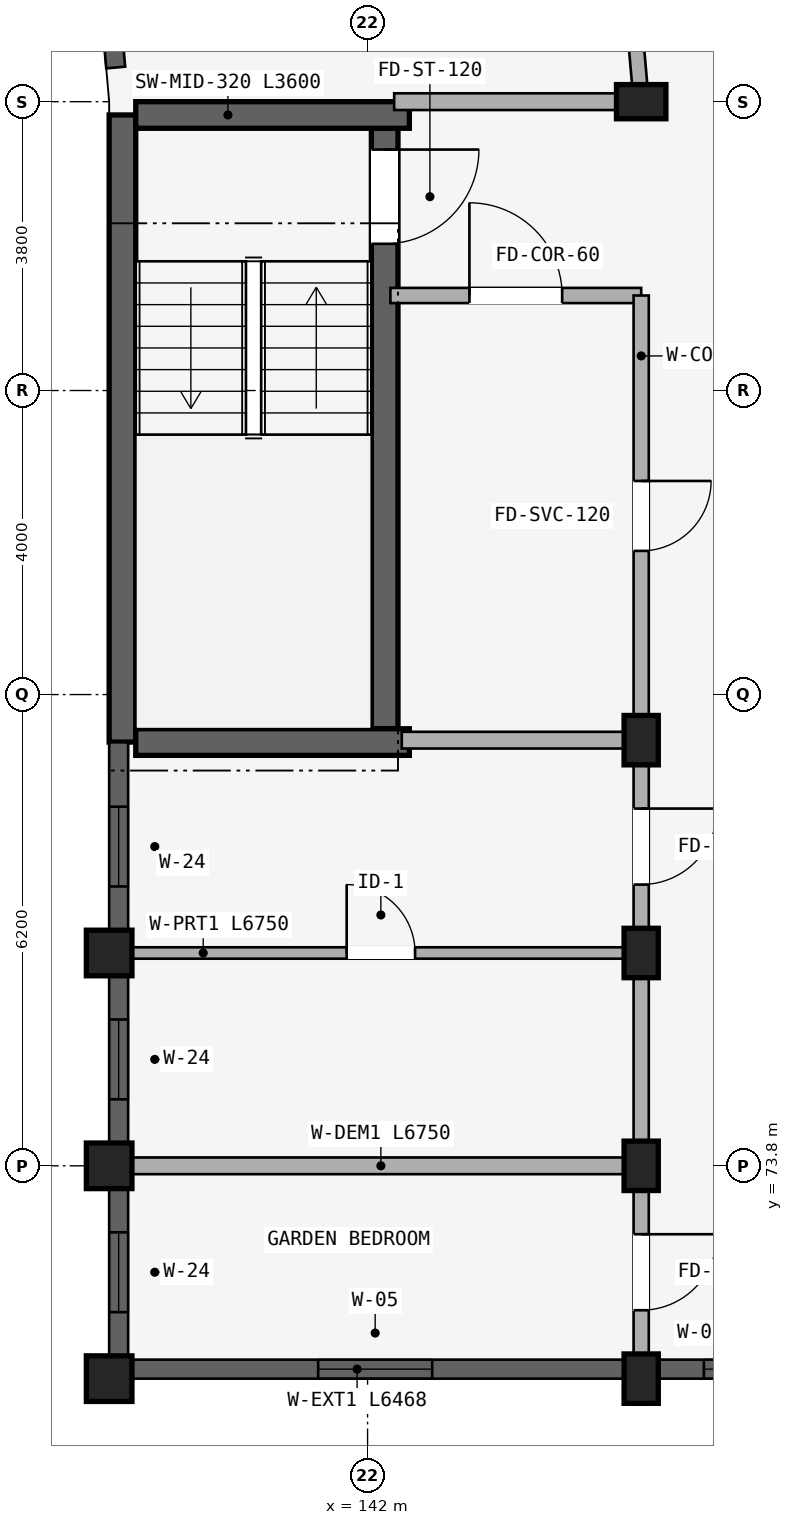
"""IFC4 building model, lengths in metres.
Left out: names, types, materials, properties, quantities, classifications, styles, units other than length and angle.
Written with IfcOpenShell. Run it as: python <this file> out.ifc"""

import sys

from ifc_helpers import new_model, si_unit, direction, frame, frame_2d, origin, origin_2d, place, context, subcontext, project, spatial, rectangle, extrude, element, fill, save


model = new_model("IFC4")
c1 = context("Model", 3, precision=1e-05, world=origin(), true_north=direction((0.0, 1.0)))
c2 = subcontext(c1, "Body", "Model", "MODEL_VIEW")
j1 = project(units=[si_unit("LENGTHUNIT", "METRE"), si_unit("PLANEANGLEUNIT", "RADIAN")], contexts=[c1])
p1 = place(None, origin())
s1 = spatial("IfcSite", under=j1, at=p1, CompositionType="ELEMENT")
p2 = place(p1, origin())
s2 = spatial("IfcBuilding", under=s1, at=p2, CompositionType="ELEMENT")
p3 = place(p2, frame((0.0, 0.0, 33.9)))
s3 = spatial("IfcBuildingStorey", under=s2, at=p3, CompositionType="ELEMENT", Elevation=33.9)
p4 = place(p3, frame((138.775, 87.625, 0.0), z_axis=(0.0, 0.0, 1.0), x_axis=(0.0, -1.0, 0.0)))
e1 = element("IfcWall", 1, at=p4, inside=s3, PredefinedType="SHEAR", context=c2, shape_type="SweptSolid", body=[
    extrude(rectangle(XDim=8.25, YDim=0.35, at=frame_2d((4.125, 0.0))), origin(), (0.0, 0.0, 1.0), 2.93),
])
p5 = place(p3, frame((142.225, 87.45, 0.0), z_axis=(0.0, 0.0, 1.0), x_axis=(0.0, -1.0, 0.0)))
e2 = element("IfcWall", 2, at=p5, inside=s3, PredefinedType="SHEAR", context=c2, shape_type="SweptSolid", body=[
    extrude(rectangle(XDim=7.9, YDim=0.35, at=frame_2d((3.95, 0.0))), origin(), (0.0, 0.0, 1.0), 2.93),
])
p6 = place(p5, frame((0.28, 0.0, 0.0)))
e3 = element("IfcOpeningElement", 3, at=p6, cuts=e2, PredefinedType="OPENING", context=c2, shape_type="SweptSolid", body=[
    extrude(rectangle(XDim=1.24, YDim=2.15, at=frame_2d((0.62, 1.075))), frame((0.0, 0.185, 0.0), z_axis=(0.0, -1.0, 0.0), x_axis=(1.0, 0.0, 0.0)), (0.0, 0.0, 1.0), 0.37),
])
for number, where, z_axis, x_axis in (
    (4, (138.95, 87.625, 0.0), (0.0, 0.0, 1.0), (1.0, 0.0, 0.0)),
    (5, (138.95, 79.375, 0.0), (0.0, 0.0, 1.0), (1.0, 0.0, 0.0)),
):
    element("IfcWall", number, at=place(p3, frame(where, z_axis=z_axis, x_axis=x_axis)), inside=s3, PredefinedType="SHEAR", context=c2, shape_type="SweptSolid", body=[
        extrude(rectangle(XDim=3.6, YDim=0.35, at=frame_2d((1.8, 0.0))), origin(), (0.0, 0.0, 1.0), 2.93),
    ])
for number, where, z_axis, x_axis in (
    (6, (145.6, 87.8, 0.0), (0.0, 0.0, 1.0), (0.0, 1.0, 0.0)),
    (7, (145.6, 79.4, 0.0), (0.0, 0.0, 1.0), (1.0, 0.0, 0.0)),
):
    element("IfcColumn", number, at=place(p3, frame(where, z_axis=z_axis, x_axis=x_axis)), inside=s3, PredefinedType="COLUMN", context=c2, shape_type="SweptSolid", body=[
        extrude(rectangle(XDim=0.45, YDim=0.65, at=origin_2d()), origin(), (0.0, 0.0, 1.0), 2.93),
    ])
p7 = place(p3, frame((138.6, 76.6, 0.0), z_axis=(0.0, 0.0, 1.0), x_axis=(1.0, 0.0, 0.0)))
e8 = element("IfcColumn", 8, at=p7, inside=s3, PredefinedType="COLUMN", context=c2, shape_type="SweptSolid", body=[
    extrude(rectangle(XDim=0.6, YDim=0.6, at=origin_2d()), origin(), (0.0, 0.0, 1.0), 2.93),
])
p8 = place(p3, frame((145.6, 76.6, 0.0), z_axis=(0.0, 0.0, 1.0), x_axis=(1.0, 0.0, 0.0)))
e9 = element("IfcColumn", 9, at=p8, inside=s3, PredefinedType="COLUMN", context=c2, shape_type="SweptSolid", body=[
    extrude(rectangle(XDim=0.45, YDim=0.65, at=origin_2d()), origin(), (0.0, 0.0, 1.0), 2.93),
])
p9 = place(p3, frame((138.6, 73.8, 0.0), z_axis=(0.0, 0.0, 1.0), x_axis=(1.0, 0.0, 0.0)))
e10 = element("IfcColumn", 10, at=p9, inside=s3, PredefinedType="COLUMN", context=c2, shape_type="SweptSolid", body=[
    extrude(rectangle(XDim=0.6, YDim=0.6, at=origin_2d()), origin(), (0.0, 0.0, 1.0), 2.93),
])
p10 = place(p3, frame((145.6, 73.8, 0.0), z_axis=(0.0, 0.0, 1.0), x_axis=(1.0, 0.0, 0.0)))
e11 = element("IfcColumn", 11, at=p10, inside=s3, PredefinedType="COLUMN", context=c2, shape_type="SweptSolid", body=[
    extrude(rectangle(XDim=0.45, YDim=0.65, at=origin_2d()), origin(), (0.0, 0.0, 1.0), 2.93),
])
p11 = place(p3, frame((138.6, 71.0, 0.0), z_axis=(0.0, 0.0, 1.0), x_axis=(1.0, 0.0, 0.0)))
e12 = element("IfcColumn", 12, at=p11, inside=s3, PredefinedType="COLUMN", context=c2, shape_type="SweptSolid", body=[
    extrude(rectangle(XDim=0.6, YDim=0.6, at=origin_2d()), origin(), (0.0, 0.0, 1.0), 2.93),
])
p12 = place(p3, frame((145.6, 71.0, 0.0), z_axis=(0.0, 0.0, 1.0), x_axis=(1.0, 0.0, 0.0)))
e13 = element("IfcColumn", 13, at=p12, inside=s3, PredefinedType="COLUMN", context=c2, shape_type="SweptSolid", body=[
    extrude(rectangle(XDim=0.45, YDim=0.65, at=origin_2d()), origin(), (0.0, 0.0, 1.0), 2.93),
])
p13 = place(p3, frame((142.3, 85.25, 0.0), z_axis=(0.0, 0.0, 1.0), x_axis=(1.0, 0.0, 0.0)))
e14 = element("IfcWall", 14, at=p13, inside=s3, PredefinedType="STANDARD", context=c2, shape_type="SweptSolid", body=[
    extrude(rectangle(XDim=3.3, YDim=0.2, at=frame_2d((1.65, 0.0))), origin(), (0.0, 0.0, 1.0), 2.372),
])
p14 = place(p13, frame((1.04, 0.0, 0.0)))
e15 = element("IfcOpeningElement", 15, at=p14, cuts=e14, PredefinedType="OPENING", context=c2, shape_type="SweptSolid", body=[
    extrude(rectangle(XDim=1.22, YDim=2.15, at=frame_2d((0.61, 1.075))), frame((0.0, 0.11, 0.0), z_axis=(0.0, -1.0, 0.0), x_axis=(1.0, 0.0, 0.0)), (0.0, 0.0, 1.0), 0.22),
])
p15 = place(p3, frame((145.6, 85.25, 0.0), z_axis=(0.0, 0.0, 1.0), x_axis=(0.0, -1.0, 0.0)))
e16 = element("IfcWall", 16, at=p15, inside=s3, PredefinedType="STANDARD", context=c2, shape_type="SweptSolid", body=[
    extrude(rectangle(XDim=5.8, YDim=0.2, at=frame_2d((2.9, 0.0))), origin(), (0.0, 0.0, 1.0), 2.372),
])
p16 = place(p15, frame((2.44, 0.0, 0.0)))
e17 = element("IfcOpeningElement", 17, at=p16, cuts=e16, PredefinedType="OPENING", context=c2, shape_type="SweptSolid", body=[
    extrude(rectangle(XDim=0.92, YDim=2.1, at=frame_2d((0.46, 1.05))), frame((0.0, 0.11, 0.0), z_axis=(0.0, -1.0, 0.0), x_axis=(1.0, 0.0, 0.0)), (0.0, 0.0, 1.0), 0.22),
])
p17 = place(p3, frame((145.208, 92.28, 0.0), z_axis=(0.0, 0.0, 1.0), x_axis=(0.087187153726, -0.996191949488, 0.0)))
e18 = element("IfcWall", 18, at=p17, inside=s3, PredefinedType="STANDARD", context=c2, shape_type="SweptSolid", body=[
    extrude(rectangle(XDim=4.497, YDim=0.2, at=frame_2d((2.249, 0.0))), origin(), (0.0, 0.0, 1.0), 2.372),
])
p18 = place(p3, frame((142.35, 87.8, 0.0), z_axis=(0.0, 0.0, 1.0), x_axis=(1.0, 0.0, 0.0)))
e19 = element("IfcWall", 19, at=p18, inside=s3, PredefinedType="STANDARD", context=c2, shape_type="SweptSolid", body=[
    extrude(rectangle(XDim=3.2, YDim=0.22, at=frame_2d((1.6, 0.0))), origin(), (0.0, 0.0, 1.0), 2.372),
])
p19 = place(p3, frame((145.6, 79.4, 0.0), z_axis=(0.0, 0.0, 1.0), x_axis=(0.0, -1.0, 0.0)))
e20 = element("IfcWall", 20, at=p19, inside=s3, PredefinedType="STANDARD", context=c2, shape_type="SweptSolid", body=[
    extrude(rectangle(XDim=2.8, YDim=0.2, at=frame_2d((1.4, 0.0))), origin(), (0.0, 0.0, 1.0), 2.372),
])
p20 = place(p19, frame((0.9, 0.0, 0.0)))
e21 = element("IfcOpeningElement", 21, at=p20, cuts=e20, PredefinedType="OPENING", context=c2, shape_type="SweptSolid", body=[
    extrude(rectangle(XDim=1.0, YDim=2.15, at=frame_2d((0.5, 1.075))), frame((0.0, 0.11, 0.0), z_axis=(0.0, -1.0, 0.0), x_axis=(1.0, 0.0, 0.0)), (0.0, 0.0, 1.0), 0.22),
])
p21 = place(p3, frame((142.45, 79.4, 0.0), z_axis=(0.0, 0.0, 1.0), x_axis=(1.0, 0.0, 0.0)))
e22 = element("IfcWall", 22, at=p21, inside=s3, PredefinedType="STANDARD", context=c2, shape_type="SweptSolid", body=[
    extrude(rectangle(XDim=3.1, YDim=0.22, at=frame_2d((1.55, 0.0))), origin(), (0.0, 0.0, 1.0), 2.372),
])
p22 = place(p3, frame((145.6, 76.6, 0.0), z_axis=(0.0, 0.0, 1.0), x_axis=(0.0, -1.0, 0.0)))
e23 = element("IfcWall", 23, at=p22, inside=s3, PredefinedType="STANDARD", context=c2, shape_type="SweptSolid", body=[
    extrude(rectangle(XDim=2.8, YDim=0.2, at=frame_2d((1.4, 0.0))), origin(), (0.0, 0.0, 1.0), 2.372),
])
p23 = place(p3, frame((138.8, 76.6, 0.0), z_axis=(0.0, 0.0, 1.0), x_axis=(1.0, 0.0, 0.0)))
e24 = element("IfcWall", 24, at=p23, inside=s3, PredefinedType="PARTITIONING", context=c2, shape_type="SweptSolid", body=[
    extrude(rectangle(XDim=6.75, YDim=0.15, at=frame_2d((3.375, 0.0))), origin(), (0.0, 0.0, 1.0), 2.372),
])
p24 = place(p23, frame((2.925, 0.0, 0.0)))
e25 = element("IfcOpeningElement", 25, at=p24, cuts=e24, PredefinedType="OPENING", context=c2, shape_type="SweptSolid", body=[
    extrude(rectangle(XDim=0.9, YDim=2.1, at=frame_2d((0.45, 1.05))), frame((0.0, 0.085, 0.0), z_axis=(0.0, -1.0, 0.0), x_axis=(1.0, 0.0, 0.0)), (0.0, 0.0, 1.0), 0.17),
])
p25 = place(p3, frame((145.6, 73.8, 0.0), z_axis=(0.0, 0.0, 1.0), x_axis=(0.0, -1.0, 0.0)))
e26 = element("IfcWall", 26, at=p25, inside=s3, PredefinedType="STANDARD", context=c2, shape_type="SweptSolid", body=[
    extrude(rectangle(XDim=2.8, YDim=0.2, at=frame_2d((1.4, 0.0))), origin(), (0.0, 0.0, 1.0), 2.372),
])
p26 = place(p25, frame((0.9, 0.0, 0.0)))
e27 = element("IfcOpeningElement", 27, at=p26, cuts=e26, PredefinedType="OPENING", context=c2, shape_type="SweptSolid", body=[
    extrude(rectangle(XDim=1.0, YDim=2.15, at=frame_2d((0.5, 1.075))), frame((0.0, 0.11, 0.0), z_axis=(0.0, -1.0, 0.0), x_axis=(1.0, 0.0, 0.0)), (0.0, 0.0, 1.0), 0.22),
])
p27 = place(p3, frame((138.8, 73.8, 0.0), z_axis=(0.0, 0.0, 1.0), x_axis=(1.0, 0.0, 0.0)))
e28 = element("IfcWall", 28, at=p27, inside=s3, PredefinedType="STANDARD", context=c2, shape_type="SweptSolid", body=[
    extrude(rectangle(XDim=6.75, YDim=0.22, at=frame_2d((3.375, 0.0))), origin(), (0.0, 0.0, 1.0), 2.372),
])
p28 = place(p3, frame((138.463, 90.798, 0.0), z_axis=(0.0, 0.0, 1.0), x_axis=(0.087222589008, -0.996188847542, 0.0)))
e29 = element("IfcWall", 29, at=p28, inside=s3, PredefinedType="STANDARD", context=c2, shape_type="SweptSolid", body=[
    extrude(rectangle(XDim=2.558, YDim=0.25, at=frame_2d((1.279, 0.0))), origin(), (0.0, 0.0, 1.0), 2.472),
])
p29 = place(p28, frame((0.585, 0.0, 0.672)))
e30 = element("IfcOpeningElement", 30, at=p29, cuts=e29, PredefinedType="OPENING", context=c2, shape_type="SweptSolid", body=[
    extrude(rectangle(XDim=1.55, YDim=1.6, at=frame_2d((0.775, 0.8))), frame((0.0, 0.135, 0.0), z_axis=(0.0, -1.0, 0.0), x_axis=(1.0, 0.0, 0.0)), (0.0, 0.0, 1.0), 0.27),
])
p30 = place(p3, frame((138.725, 79.372, 0.0), z_axis=(0.0, 0.0, 1.0), x_axis=(0.0, -1.0, 0.0)))
e31 = element("IfcWall", 31, at=p30, inside=s3, PredefinedType="STANDARD", context=c2, shape_type="SweptSolid", body=[
    extrude(rectangle(XDim=2.468, YDim=0.25, at=frame_2d((1.234, 0.0))), origin(), (0.0, 0.0, 1.0), 2.472),
])
p31 = place(p30, frame((0.846, 0.0, 0.88)))
e32 = element("IfcOpeningElement", 32, at=p31, cuts=e31, PredefinedType="OPENING", context=c2, shape_type="SweptSolid", body=[
    extrude(rectangle(XDim=1.05, YDim=1.25, at=frame_2d((0.525, 0.625))), frame((0.0, 0.135, 0.0), z_axis=(0.0, -1.0, 0.0), x_axis=(1.0, 0.0, 0.0)), (0.0, 0.0, 1.0), 0.27),
])
p32 = place(p3, frame((138.725, 76.296, 0.0), z_axis=(0.0, 0.0, 1.0), x_axis=(0.0, -1.0, 0.0)))
e33 = element("IfcWall", 33, at=p32, inside=s3, PredefinedType="STANDARD", context=c2, shape_type="SweptSolid", body=[
    extrude(rectangle(XDim=2.193, YDim=0.25, at=frame_2d((1.096, 0.0))), origin(), (0.0, 0.0, 1.0), 2.472),
])
p33 = place(p32, frame((0.572, 0.0, 0.88)))
e34 = element("IfcOpeningElement", 34, at=p33, cuts=e33, PredefinedType="OPENING", context=c2, shape_type="SweptSolid", body=[
    extrude(rectangle(XDim=1.05, YDim=1.25, at=frame_2d((0.525, 0.625))), frame((0.0, 0.135, 0.0), z_axis=(0.0, -1.0, 0.0), x_axis=(1.0, 0.0, 0.0)), (0.0, 0.0, 1.0), 0.27),
])
p34 = place(p3, frame((138.725, 73.497, 0.0), z_axis=(0.0, 0.0, 1.0), x_axis=(0.0, -1.0, 0.0)))
e35 = element("IfcWall", 35, at=p34, inside=s3, PredefinedType="STANDARD", context=c2, shape_type="SweptSolid", body=[
    extrude(rectangle(XDim=2.193, YDim=0.25, at=frame_2d((1.097, 0.0))), origin(), (0.0, 0.0, 1.0), 2.472),
])
p35 = place(p34, frame((0.572, 0.0, 0.88)))
e36 = element("IfcOpeningElement", 36, at=p35, cuts=e35, PredefinedType="OPENING", context=c2, shape_type="SweptSolid", body=[
    extrude(rectangle(XDim=1.05, YDim=1.25, at=frame_2d((0.525, 0.625))), frame((0.0, 0.135, 0.0), z_axis=(0.0, -1.0, 0.0), x_axis=(1.0, 0.0, 0.0)), (0.0, 0.0, 1.0), 0.27),
])
p36 = place(p3, frame((138.904, 71.125, 0.0), z_axis=(0.0, 0.0, 1.0), x_axis=(1.0, 0.0, 0.0)))
e37 = element("IfcWall", 37, at=p36, inside=s3, PredefinedType="STANDARD", context=c2, shape_type="SweptSolid", body=[
    extrude(rectangle(XDim=6.468, YDim=0.25, at=frame_2d((3.234, 0.0))), origin(), (0.0, 0.0, 1.0), 2.372),
])
p37 = place(p36, frame((2.447, 0.0, 0.522)))
e38 = element("IfcOpeningElement", 38, at=p37, cuts=e37, PredefinedType="OPENING", context=c2, shape_type="SweptSolid", body=[
    extrude(rectangle(XDim=1.5, YDim=1.65, at=frame_2d((0.75, 0.825))), frame((0.0, 0.135, 0.0), z_axis=(0.0, -1.0, 0.0), x_axis=(1.0, 0.0, 0.0)), (0.0, 0.0, 1.0), 0.27),
])
p38 = place(p3, frame((145.829, 71.125, 0.0), z_axis=(0.0, 0.0, 1.0), x_axis=(1.0, 0.0, 0.0)))
e39 = element("IfcWall", 39, at=p38, inside=s3, PredefinedType="STANDARD", context=c2, shape_type="SweptSolid", body=[
    extrude(rectangle(XDim=1.943, YDim=0.25, at=frame_2d((0.971, 0.0))), origin(), (0.0, 0.0, 1.0), 2.372),
])
p39 = place(p38, frame((0.596, 0.0, 0.88)))
e40 = element("IfcOpeningElement", 40, at=p39, cuts=e39, PredefinedType="OPENING", context=c2, shape_type="SweptSolid", body=[
    extrude(rectangle(XDim=0.75, YDim=1.05, at=frame_2d((0.375, 0.525))), frame((0.0, 0.135, 0.0), z_axis=(0.0, -1.0, 0.0), x_axis=(1.0, 0.0, 0.0)), (0.0, 0.0, 1.0), 0.27),
])
p40 = place(p31, origin())
e41 = element("IfcWindow", 41, at=p40, inside=s3, PartitioningType="SINGLE_PANEL", PredefinedType="WINDOW", context=c2, shape_type="SweptSolid", body=[
    extrude(rectangle(XDim=1.05, YDim=1.25, at=frame_2d((0.525, 0.625))), frame((0.0, 0.03, 0.0), z_axis=(0.0, -1.0, 0.0), x_axis=(1.0, 0.0, 0.0)), (0.0, 0.0, 1.0), 0.06),
])
fill(e32, e41)
p41 = place(p33, origin())
e42 = element("IfcWindow", 42, at=p41, inside=s3, PartitioningType="SINGLE_PANEL", PredefinedType="WINDOW", context=c2, shape_type="SweptSolid", body=[
    extrude(rectangle(XDim=1.05, YDim=1.25, at=frame_2d((0.525, 0.625))), frame((0.0, 0.03, 0.0), z_axis=(0.0, -1.0, 0.0), x_axis=(1.0, 0.0, 0.0)), (0.0, 0.0, 1.0), 0.06),
])
fill(e34, e42)
p42 = place(p35, origin())
e43 = element("IfcWindow", 43, at=p42, inside=s3, PartitioningType="SINGLE_PANEL", PredefinedType="WINDOW", context=c2, shape_type="SweptSolid", body=[
    extrude(rectangle(XDim=1.05, YDim=1.25, at=frame_2d((0.525, 0.625))), frame((0.0, 0.03, 0.0), z_axis=(0.0, -1.0, 0.0), x_axis=(1.0, 0.0, 0.0)), (0.0, 0.0, 1.0), 0.06),
])
fill(e36, e43)
p43 = place(p37, origin())
e44 = element("IfcWindow", 44, at=p43, inside=s3, PartitioningType="DOUBLE_PANEL_VERTICAL", PredefinedType="WINDOW", context=c2, shape_type="SweptSolid", body=[
    extrude(rectangle(XDim=1.5, YDim=1.65, at=frame_2d((0.75, 0.825))), frame((0.0, 0.03, 0.0), z_axis=(0.0, -1.0, 0.0), x_axis=(1.0, 0.0, 0.0)), (0.0, 0.0, 1.0), 0.06),
])
fill(e38, e44)
p44 = place(p39, origin())
e45 = element("IfcWindow", 45, at=p44, inside=s3, PartitioningType="SINGLE_PANEL", PredefinedType="WINDOW", context=c2, shape_type="SweptSolid", body=[
    extrude(rectangle(XDim=0.75, YDim=1.05, at=frame_2d((0.375, 0.525))), frame((0.0, 0.03, 0.0), z_axis=(0.0, -1.0, 0.0), x_axis=(1.0, 0.0, 0.0)), (0.0, 0.0, 1.0), 0.06),
])
fill(e40, e45)
p45 = place(p6, frame((1.24, 0.0, 0.0), z_axis=(0.0, 0.0, 1.0), x_axis=(-1.0, 0.0, 0.0)))
e46 = element("IfcDoor", 46, at=p45, inside=s3, OperationType="SINGLE_SWING_RIGHT", PredefinedType="DOOR", context=c2, shape_type="SweptSolid", body=[
    extrude(rectangle(XDim=1.24, YDim=2.15, at=frame_2d((0.62, 1.075))), frame((0.0, 0.025, 0.0), z_axis=(0.0, -1.0, 0.0), x_axis=(1.0, 0.0, 0.0)), (0.0, 0.0, 1.0), 0.05),
])
fill(e3, e46)
p46 = place(p14, frame((1.22, 0.0, 0.0), z_axis=(0.0, 0.0, 1.0), x_axis=(-1.0, 0.0, 0.0)))
e47 = element("IfcDoor", 47, at=p46, inside=s3, OperationType="SINGLE_SWING_RIGHT", PredefinedType="DOOR", context=c2, shape_type="SweptSolid", body=[
    extrude(rectangle(XDim=1.22, YDim=2.15, at=frame_2d((0.61, 1.075))), frame((0.0, 0.025, 0.0), z_axis=(0.0, -1.0, 0.0), x_axis=(1.0, 0.0, 0.0)), (0.0, 0.0, 1.0), 0.05),
])
fill(e15, e47)
p47 = place(p16, origin())
e48 = element("IfcDoor", 48, at=p47, inside=s3, OperationType="SINGLE_SWING_LEFT", PredefinedType="DOOR", context=c2, shape_type="SweptSolid", body=[
    extrude(rectangle(XDim=0.92, YDim=2.1, at=frame_2d((0.46, 1.05))), frame((0.0, 0.025, 0.0), z_axis=(0.0, -1.0, 0.0), x_axis=(1.0, 0.0, 0.0)), (0.0, 0.0, 1.0), 0.05),
])
fill(e17, e48)
p48 = place(p20, frame((1.0, 0.0, 0.0), z_axis=(0.0, 0.0, 1.0), x_axis=(-1.0, 0.0, 0.0)))
e49 = element("IfcDoor", 49, at=p48, inside=s3, OperationType="SINGLE_SWING_RIGHT", PredefinedType="DOOR", context=c2, shape_type="SweptSolid", body=[
    extrude(rectangle(XDim=1.0, YDim=2.15, at=frame_2d((0.5, 1.075))), frame((0.0, 0.025, 0.0), z_axis=(0.0, -1.0, 0.0), x_axis=(1.0, 0.0, 0.0)), (0.0, 0.0, 1.0), 0.05),
])
fill(e21, e49)
p49 = place(p24, frame((0.9, 0.0, 0.0), z_axis=(0.0, 0.0, 1.0), x_axis=(-1.0, 0.0, 0.0)))
e50 = element("IfcDoor", 50, at=p49, inside=s3, OperationType="SINGLE_SWING_RIGHT", PredefinedType="DOOR", context=c2, shape_type="SweptSolid", body=[
    extrude(rectangle(XDim=0.9, YDim=2.1, at=frame_2d((0.45, 1.05))), frame((0.0, 0.025, 0.0), z_axis=(0.0, -1.0, 0.0), x_axis=(1.0, 0.0, 0.0)), (0.0, 0.0, 1.0), 0.05),
])
fill(e25, e50)
p50 = place(p26, frame((1.0, 0.0, 0.0), z_axis=(0.0, 0.0, 1.0), x_axis=(-1.0, 0.0, 0.0)))
e51 = element("IfcDoor", 51, at=p50, inside=s3, OperationType="SINGLE_SWING_RIGHT", PredefinedType="DOOR", context=c2, shape_type="SweptSolid", body=[
    extrude(rectangle(XDim=1.0, YDim=2.15, at=frame_2d((0.5, 1.075))), frame((0.0, 0.025, 0.0), z_axis=(0.0, -1.0, 0.0), x_axis=(1.0, 0.0, 0.0)), (0.0, 0.0, 1.0), 0.05),
])
fill(e27, e51)
save(model, sys.argv[1])
